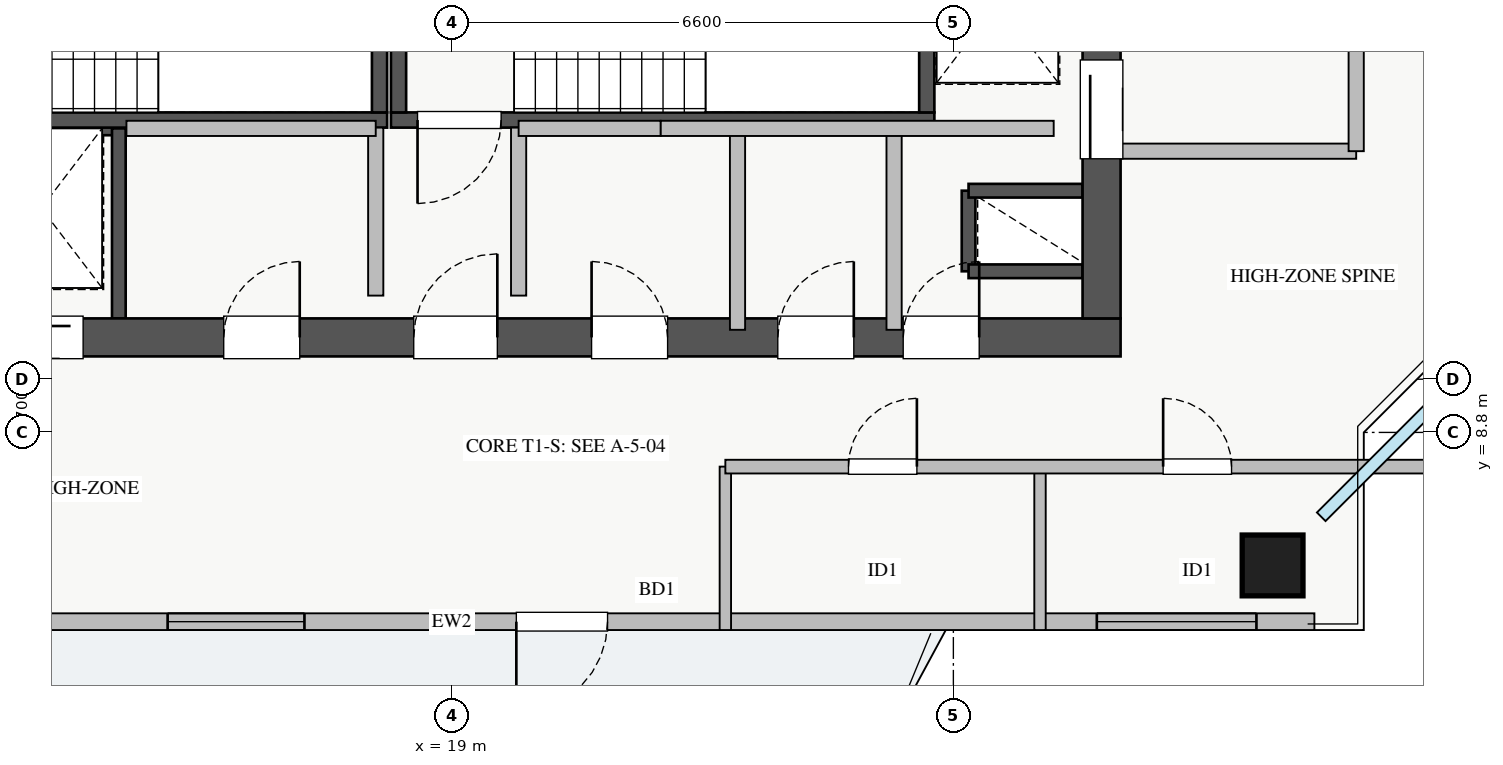
"""IFC4 building model, lengths in metres.
Left out: names, types, materials, properties, quantities, classifications, styles, units other than length and angle.
Written with IfcOpenShell. Run it as: python <this file> out.ifc"""

import sys

from ifc_helpers import new_model, si_unit, direction, frame, frame_2d, origin, origin_2d, place, context, subcontext, project, spatial, rectangle, extrude, source, transform, mapped, element, fill, save


model = new_model("IFC4")
c1 = context("Model", 3, precision=1e-05, world=origin(), true_north=direction((0.0, 1.0)))
c2 = subcontext(c1, "Body", "Model", "MODEL_VIEW")
j1 = project(units=[si_unit("LENGTHUNIT", "METRE"), si_unit("PLANEANGLEUNIT", "RADIAN")], contexts=[c1])
p1 = place(None, origin())
s1 = spatial("IfcSite", under=j1, at=p1, CompositionType="ELEMENT")
p2 = place(p1, origin())
s2 = spatial("IfcBuilding", under=s1, at=p2, CompositionType="ELEMENT")
p3 = place(p2, frame((0.0, 0.0, 200.25)))
s3 = spatial("IfcBuildingStorey", under=s2, at=p3, CompositionType="ELEMENT", Elevation=200.25)
p4 = place(p3, frame((12.68, 12.8, 0.0), z_axis=(0.0, 0.0, 1.0), x_axis=(1.0, 0.0, 0.0)))
e1 = element("IfcWall", 1, at=p4, inside=s3, PredefinedType="SHEAR", context=c2, shape_type="SweptSolid", body=[
    extrude(rectangle(XDim=1.94, YDim=0.18, at=frame_2d((0.97, 0.0))), origin(), (0.0, 0.0, 1.0), 3.07),
])
p5 = place(p3, frame((14.62, 10.3, 0.0), z_axis=(0.0, 0.0, 1.0), x_axis=(0.0, 1.0, 0.0)))
e2 = element("IfcWall", 2, at=p5, inside=s3, PredefinedType="SHEAR", context=c2, shape_type="SweptSolid", body=[
    extrude(rectangle(XDim=2.5, YDim=0.18, at=frame_2d((1.25, 0.0))), origin(), (0.0, 0.0, 1.0), 3.07),
])
p6 = place(p3, frame((25.8, 10.92, 0.0), z_axis=(0.0, 0.0, 1.0), x_axis=(0.0, 1.0, 0.0)))
e3 = element("IfcWall", 3, at=p6, inside=s3, PredefinedType="SHEAR", context=c2, shape_type="SweptSolid", body=[
    extrude(rectangle(XDim=1.06, YDim=0.18, at=frame_2d((0.53, 0.0))), origin(), (0.0, 0.0, 1.0), 3.07),
])
for number, where, z_axis, x_axis in (
    (4, (25.8, 11.98, 0.0), (0.0, 0.0, 1.0), (1.0, 0.0, 0.0)),
    (5, (25.8, 10.92, 0.0), (0.0, 0.0, 1.0), (1.0, 0.0, 0.0)),
):
    element("IfcWall", number, at=place(p3, frame(where, z_axis=z_axis, x_axis=x_axis)), inside=s3, PredefinedType="SHEAR", context=c2, shape_type="SweptSolid", body=[
        extrude(rectangle(XDim=1.5, YDim=0.18, at=frame_2d((0.75, 0.0))), origin(), (0.0, 0.0, 1.0), 3.07),
    ])
p7 = place(p3, frame((10.7, 12.91, 0.0), z_axis=(0.0, 0.0, 1.0), x_axis=(1.0, 0.0, 0.0)))
e6 = element("IfcWall", 6, at=p7, inside=s3, PredefinedType="SHEAR", context=c2, shape_type="SweptSolid", body=[
    extrude(rectangle(XDim=7.45, YDim=0.2, at=frame_2d((3.725, 0.0))), origin(), (0.0, 0.0, 1.0), 3.25),
])
p8 = place(p7, frame((0.35, 0.0, 0.0)))
e7 = element("IfcOpeningElement", 7, at=p8, cuts=e6, PredefinedType="OPENING", context=c2, shape_type="SweptSolid", body=[
    extrude(rectangle(XDim=1.1, YDim=2.05, at=frame_2d((0.55, 1.025))), frame((0.0, 0.11, 0.0), z_axis=(0.0, -1.0, 0.0), x_axis=(1.0, 0.0, 0.0)), (0.0, 0.0, 1.0), 0.22),
])
p9 = place(p3, frame((18.05, 13.01, 0.0), z_axis=(0.0, 0.0, 1.0), x_axis=(0.0, 1.0, 0.0)))
e8 = element("IfcWall", 8, at=p9, inside=s3, PredefinedType="SHEAR", context=c2, shape_type="SweptSolid", body=[
    extrude(rectangle(XDim=2.94, YDim=0.2, at=frame_2d((1.47, 0.0))), origin(), (0.0, 0.0, 1.0), 3.25),
])
p10 = place(p3, frame((18.2, 12.91, 0.0), z_axis=(0.0, 0.0, 1.0), x_axis=(1.0, 0.0, 0.0)))
e9 = element("IfcWall", 9, at=p10, inside=s3, PredefinedType="SHEAR", context=c2, shape_type="SweptSolid", body=[
    extrude(rectangle(XDim=7.15, YDim=0.2, at=frame_2d((3.575, 0.0))), origin(), (0.0, 0.0, 1.0), 3.25),
])
p11 = place(p10, frame((0.35, 0.0, 0.0)))
e10 = element("IfcOpeningElement", 10, at=p11, cuts=e9, PredefinedType="OPENING", context=c2, shape_type="SweptSolid", body=[
    extrude(rectangle(XDim=1.1, YDim=2.05, at=frame_2d((0.55, 1.025))), frame((0.0, 0.11, 0.0), z_axis=(0.0, -1.0, 0.0), x_axis=(1.0, 0.0, 0.0)), (0.0, 0.0, 1.0), 0.22),
])
for number, where, z_axis, x_axis in (
    (11, (18.3, 13.01, 0.0), (0.0, 0.0, 1.0), (0.0, 1.0, 0.0)),
    (12, (25.25, 13.01, 0.0), (0.0, 0.0, 1.0), (0.0, 1.0, 0.0)),
):
    element("IfcWall", number, at=place(p3, frame(where, z_axis=z_axis, x_axis=x_axis)), inside=s3, PredefinedType="SHEAR", context=c2, shape_type="SweptSolid", body=[
        extrude(rectangle(XDim=2.94, YDim=0.2, at=frame_2d((1.47, 0.0))), origin(), (0.0, 0.0, 1.0), 3.25),
    ])
p12 = place(p3, frame((10.2, 10.05, 0.0), z_axis=(0.0, 0.0, 1.0), x_axis=(1.0, 0.0, 0.0)))
e13 = element("IfcWall", 13, at=p12, inside=s3, PredefinedType="SHEAR", context=c2, shape_type="SweptSolid", body=[
    extrude(rectangle(XDim=17.6, YDim=0.5, at=frame_2d((8.8, 0.0))), origin(), (0.0, 0.0, 1.0), 3.25),
])
p13 = place(p12, frame((1.15, 0.0, 0.0)))
e14 = element("IfcOpeningElement", 14, at=p13, cuts=e13, PredefinedType="OPENING", context=c2, shape_type="SweptSolid", body=[
    extrude(rectangle(XDim=1.1, YDim=2.05, at=frame_2d((0.55, 1.025))), frame((0.0, 0.26, 0.0), z_axis=(0.0, -1.0, 0.0), x_axis=(1.0, 0.0, 0.0)), (0.0, 0.0, 1.0), 0.52),
])
p14 = place(p12, frame((8.3, 0.0, 0.0)))
e15 = element("IfcOpeningElement", 15, at=p14, cuts=e13, PredefinedType="OPENING", context=c2, shape_type="SweptSolid", body=[
    extrude(rectangle(XDim=1.1, YDim=2.05, at=frame_2d((0.55, 1.025))), frame((0.0, 0.26, 0.0), z_axis=(0.0, -1.0, 0.0), x_axis=(1.0, 0.0, 0.0)), (0.0, 0.0, 1.0), 0.52),
])
p15 = place(p12, frame((2.85, 0.0, 0.0)))
e16 = element("IfcOpeningElement", 16, at=p15, cuts=e13, PredefinedType="OPENING", context=c2, shape_type="SweptSolid", body=[
    extrude(rectangle(XDim=1.1, YDim=2.05, at=frame_2d((0.55, 1.025))), frame((0.0, 0.26, 0.0), z_axis=(0.0, -1.0, 0.0), x_axis=(1.0, 0.0, 0.0)), (0.0, 0.0, 1.0), 0.52),
])
p16 = place(p12, frame((5.8, 0.0, 0.0)))
e17 = element("IfcOpeningElement", 17, at=p16, cuts=e13, PredefinedType="OPENING", context=c2, shape_type="SweptSolid", body=[
    extrude(rectangle(XDim=1.0, YDim=2.05, at=frame_2d((0.5, 1.025))), frame((0.0, 0.26, 0.0), z_axis=(0.0, -1.0, 0.0), x_axis=(1.0, 0.0, 0.0)), (0.0, 0.0, 1.0), 0.52),
])
p17 = place(p12, frame((14.74, 0.0, 0.0)))
e18 = element("IfcOpeningElement", 18, at=p17, cuts=e13, PredefinedType="OPENING", context=c2, shape_type="SweptSolid", body=[
    extrude(rectangle(XDim=1.0, YDim=2.05, at=frame_2d((0.5, 1.025))), frame((0.0, 0.26, 0.0), z_axis=(0.0, -1.0, 0.0), x_axis=(1.0, 0.0, 0.0)), (0.0, 0.0, 1.0), 0.52),
])
p18 = place(p12, frame((10.64, 0.0, 0.0)))
e19 = element("IfcOpeningElement", 19, at=p18, cuts=e13, PredefinedType="OPENING", context=c2, shape_type="SweptSolid", body=[
    extrude(rectangle(XDim=1.0, YDim=2.05, at=frame_2d((0.5, 1.025))), frame((0.0, 0.26, 0.0), z_axis=(0.0, -1.0, 0.0), x_axis=(1.0, 0.0, 0.0)), (0.0, 0.0, 1.0), 0.52),
])
p19 = place(p12, frame((13.09, 0.0, 0.0)))
e20 = element("IfcOpeningElement", 20, at=p19, cuts=e13, PredefinedType="OPENING", context=c2, shape_type="SweptSolid", body=[
    extrude(rectangle(XDim=1.0, YDim=2.05, at=frame_2d((0.5, 1.025))), frame((0.0, 0.26, 0.0), z_axis=(0.0, -1.0, 0.0), x_axis=(1.0, 0.0, 0.0)), (0.0, 0.0, 1.0), 0.52),
])
p20 = place(p3, frame((27.55, 10.3, 0.0), z_axis=(0.0, 0.0, 1.0), x_axis=(0.0, 1.0, 0.0)))
e21 = element("IfcWall", 21, at=p20, inside=s3, PredefinedType="SHEAR", context=c2, shape_type="SweptSolid", body=[
    extrude(rectangle(XDim=6.2, YDim=0.5, at=frame_2d((3.1, 0.0))), origin(), (0.0, 0.0, 1.0), 3.25),
])
p21 = place(p20, frame((2.1, 0.0, 0.0)))
e22 = element("IfcOpeningElement", 22, at=p21, cuts=e21, PredefinedType="OPENING", context=c2, shape_type="SweptSolid", body=[
    extrude(rectangle(XDim=1.3, YDim=2.05, at=frame_2d((0.65, 1.025))), frame((0.0, 0.26, 0.0), z_axis=(0.0, -1.0, 0.0), x_axis=(1.0, 0.0, 0.0)), (0.0, 0.0, 1.0), 0.52),
])
m1 = source(origin(), c2, "Body", "SweptSolid", [
    extrude(rectangle(XDim=0.8, YDim=0.8, at=origin_2d()), origin(), (0.0, 0.0, 1.0), 3.25),
])
p22 = place(p3, frame((29.8, 7.05, 0.0), z_axis=(0.0, 0.0, 1.0), x_axis=(1.0, 0.0, 0.0)))
e23 = element("IfcColumn", 23, at=p22, inside=s3, PredefinedType="COLUMN", context=c2, shape_type="MappedRepresentation", body=[
    mapped(m1, transform((0.0, 0.0, 0.0), x_axis=(1.0, 0.0, 0.0), y_axis=(0.0, 1.0, 0.0), z_axis=(0.0, 0.0, 1.0), scale=1.0)),
])
p23 = place(p3, frame((7.65, 6.31, 0.0), z_axis=(0.0, 0.0, 1.0), x_axis=(1.0, 0.0, 0.0)))
e24 = element("IfcWall", 24, at=p23, inside=s3, PredefinedType="STANDARD", context=c2, shape_type="SweptSolid", body=[
    extrude(rectangle(XDim=22.7, YDim=0.22, at=frame_2d((11.35, 0.0))), origin(), (0.0, 0.0, 1.0), 2.61),
])
p24 = place(p23, frame((12.2, 0.0, 0.0)))
e25 = element("IfcOpeningElement", 25, at=p24, cuts=e24, PredefinedType="OPENING", context=c2, shape_type="SweptSolid", body=[
    extrude(rectangle(XDim=1.2, YDim=2.1, at=frame_2d((0.6, 1.05))), frame((0.0, 0.12, 0.0), z_axis=(0.0, -1.0, 0.0), x_axis=(1.0, 0.0, 0.0)), (0.0, 0.0, 1.0), 0.24),
])
p25 = place(p23, frame((1.637, 0.0, 0.9)))
e26 = element("IfcOpeningElement", 26, at=p25, cuts=e24, PredefinedType="OPENING", context=c2, shape_type="SweptSolid", body=[
    extrude(rectangle(XDim=2.4, YDim=1.48, at=frame_2d((1.2, 0.74))), frame((0.0, 0.12, 0.0), z_axis=(0.0, -1.0, 0.0), x_axis=(1.0, 0.0, 0.0)), (0.0, 0.0, 1.0), 0.24),
])
p26 = place(p23, frame((7.612, 0.0, 0.9)))
e27 = element("IfcOpeningElement", 27, at=p26, cuts=e24, PredefinedType="OPENING", context=c2, shape_type="SweptSolid", body=[
    extrude(rectangle(XDim=1.8, YDim=1.45, at=frame_2d((0.9, 0.725))), frame((0.0, 0.12, 0.0), z_axis=(0.0, -1.0, 0.0), x_axis=(1.0, 0.0, 0.0)), (0.0, 0.0, 1.0), 0.24),
])
p27 = place(p23, frame((19.837, 0.0, 0.9)))
e28 = element("IfcOpeningElement", 28, at=p27, cuts=e24, PredefinedType="OPENING", context=c2, shape_type="SweptSolid", body=[
    extrude(rectangle(XDim=2.1, YDim=1.5, at=frame_2d((1.05, 0.75))), frame((0.0, 0.12, 0.0), z_axis=(0.0, -1.0, 0.0), x_axis=(1.0, 0.0, 0.0)), (0.0, 0.0, 1.0), 0.24),
])
p28 = place(p3, frame((27.8, 12.5, 0.0), z_axis=(0.0, 0.0, 1.0), x_axis=(1.0, 0.0, 0.0)))
e29 = element("IfcWall", 29, at=p28, inside=s3, PredefinedType="PARTITIONING", context=c2, shape_type="SweptSolid", body=[
    extrude(rectangle(XDim=3.1, YDim=0.2, at=frame_2d((1.55, 0.0))), origin(), (0.0, 0.0, 1.0), 2.265),
])
p29 = place(p3, frame((30.9, 12.5, 0.0), z_axis=(0.0, 0.0, 1.0), x_axis=(0.0, 1.0, 0.0)))
e30 = element("IfcWall", 30, at=p29, inside=s3, PredefinedType="PARTITIONING", context=c2, shape_type="SweptSolid", body=[
    extrude(rectangle(XDim=3.9, YDim=0.2, at=frame_2d((1.95, 0.0))), origin(), (0.0, 0.0, 1.0), 3.07),
])
p30 = place(p29, frame((1.4, 0.0, 0.0)))
e31 = element("IfcOpeningElement", 31, at=p30, cuts=e30, PredefinedType="OPENING", context=c2, shape_type="SweptSolid", body=[
    extrude(rectangle(XDim=1.1, YDim=2.05, at=frame_2d((0.55, 1.025))), frame((0.0, 0.11, 0.0), z_axis=(0.0, -1.0, 0.0), x_axis=(1.0, 0.0, 0.0)), (0.0, 0.0, 1.0), 0.22),
])
for number, where, z_axis, x_axis in (
    (32, (18.0, 10.6, 0.0), (0.0, 0.0, 1.0), (0.0, 1.0, 0.0)),
    (33, (19.88, 10.6, 0.0), (0.0, 0.0, 1.0), (0.0, 1.0, 0.0)),
):
    element("IfcWall", number, at=place(p3, frame(where, z_axis=z_axis, x_axis=x_axis)), inside=s3, PredefinedType="PARTITIONING", context=c2, shape_type="SweptSolid", body=[
        extrude(rectangle(XDim=2.21, YDim=0.2, at=frame_2d((1.105, 0.0))), origin(), (0.0, 0.0, 1.0), 3.07),
    ])
p31 = place(p3, frame((14.72, 12.8, 0.0), z_axis=(0.0, 0.0, 1.0), x_axis=(1.0, 0.0, 0.0)))
e34 = element("IfcWall", 34, at=p31, inside=s3, PredefinedType="PARTITIONING", context=c2, shape_type="SweptSolid", body=[
    extrude(rectangle(XDim=3.28, YDim=0.2, at=frame_2d((1.64, 0.0))), origin(), (0.0, 0.0, 1.0), 3.07),
])
p32 = place(p3, frame((24.82, 10.15, 0.0), z_axis=(0.0, 0.0, 1.0), x_axis=(0.0, 1.0, 0.0)))
e35 = element("IfcWall", 35, at=p32, inside=s3, PredefinedType="PARTITIONING", context=c2, shape_type="SweptSolid", body=[
    extrude(rectangle(XDim=2.65, YDim=0.2, at=frame_2d((1.325, 0.0))), origin(), (0.0, 0.0, 1.0), 3.07),
])
p33 = place(p3, frame((19.88, 12.8, 0.0), z_axis=(0.0, 0.0, 1.0), x_axis=(1.0, 0.0, 0.0)))
e36 = element("IfcWall", 36, at=p33, inside=s3, PredefinedType="PARTITIONING", context=c2, shape_type="SweptSolid", body=[
    extrude(rectangle(XDim=1.87, YDim=0.2, at=frame_2d((0.935, 0.0))), origin(), (0.0, 0.0, 1.0), 3.07),
])
p34 = place(p3, frame((22.76, 10.15, 0.0), z_axis=(0.0, 0.0, 1.0), x_axis=(0.0, 1.0, 0.0)))
e37 = element("IfcWall", 37, at=p34, inside=s3, PredefinedType="PARTITIONING", context=c2, shape_type="SweptSolid", body=[
    extrude(rectangle(XDim=2.65, YDim=0.2, at=frame_2d((1.325, 0.0))), origin(), (0.0, 0.0, 1.0), 3.07),
])
p35 = place(p3, frame((21.75, 12.8, 0.0), z_axis=(0.0, 0.0, 1.0), x_axis=(1.0, 0.0, 0.0)))
e38 = element("IfcWall", 38, at=p35, inside=s3, PredefinedType="PARTITIONING", context=c2, shape_type="SweptSolid", body=[
    extrude(rectangle(XDim=5.17, YDim=0.2, at=frame_2d((2.585, 0.0))), origin(), (0.0, 0.0, 1.0), 3.07),
])
for number, where, z_axis, x_axis in (
    (39, (22.6, 6.2, 0.0), (0.0, 0.0, 1.0), (0.0, 1.0, 0.0)),
    (40, (26.74, 6.2, 0.0), (0.0, 0.0, 1.0), (0.0, 1.0, 0.0)),
):
    element("IfcWall", number, at=place(p3, frame(where, z_axis=z_axis, x_axis=x_axis)), inside=s3, PredefinedType="PARTITIONING", context=c2, shape_type="SweptSolid", body=[
        extrude(rectangle(XDim=2.15, YDim=0.15, at=frame_2d((1.075, 0.0))), origin(), (0.0, 0.0, 1.0), 3.07),
    ])
p36 = place(p3, frame((22.6, 8.35, 0.0), z_axis=(0.0, 0.0, 1.0), x_axis=(1.0, 0.0, 0.0)))
e41 = element("IfcWall", 41, at=p36, inside=s3, PredefinedType="PARTITIONING", context=c2, shape_type="SweptSolid", body=[
    extrude(rectangle(XDim=9.85, YDim=0.18, at=frame_2d((4.925, 0.0))), origin(), (0.0, 0.0, 1.0), 3.07),
])
p37 = place(p36, frame((1.62, 0.0, 0.0)))
e42 = element("IfcOpeningElement", 42, at=p37, cuts=e41, PredefinedType="OPENING", context=c2, shape_type="SweptSolid", body=[
    extrude(rectangle(XDim=0.9, YDim=2.05, at=frame_2d((0.45, 1.025))), frame((0.0, 0.1, 0.0), z_axis=(0.0, -1.0, 0.0), x_axis=(1.0, 0.0, 0.0)), (0.0, 0.0, 1.0), 0.2),
])
p38 = place(p36, frame((5.76, 0.0, 0.0)))
e43 = element("IfcOpeningElement", 43, at=p38, cuts=e41, PredefinedType="OPENING", context=c2, shape_type="SweptSolid", body=[
    extrude(rectangle(XDim=0.9, YDim=2.05, at=frame_2d((0.45, 1.025))), frame((0.0, 0.1, 0.0), z_axis=(0.0, -1.0, 0.0), x_axis=(1.0, 0.0, 0.0)), (0.0, 0.0, 1.0), 0.2),
])
m2 = source(origin(), c2, "Body", "SweptSolid", [
    extrude(rectangle(XDim=1.2, YDim=2.1, at=frame_2d((0.6, 1.05))), frame((0.0, 0.025, 0.0), z_axis=(0.0, -1.0, 0.0), x_axis=(1.0, 0.0, 0.0)), (0.0, 0.0, 1.0), 0.05),
])
p39 = place(p24, frame((1.2, 0.0, 0.0), z_axis=(0.0, 0.0, 1.0), x_axis=(-1.0, 0.0, 0.0)))
e44 = element("IfcDoor", 44, at=p39, inside=s3, OperationType="SINGLE_SWING_LEFT", PredefinedType="DOOR", context=c2, shape_type="MappedRepresentation", body=[
    mapped(m2, transform((0.0, 0.0, 0.0), x_axis=(1.0, 0.0, 0.0), y_axis=(0.0, 1.0, 0.0), z_axis=(0.0, 0.0, 1.0), scale=1.0)),
])
fill(e25, e44)
m3 = source(origin(), c2, "Body", "SweptSolid", [
    extrude(rectangle(XDim=1.8, YDim=1.45, at=frame_2d((0.9, 0.725))), frame((0.0, 0.03, 0.0), z_axis=(0.0, -1.0, 0.0), x_axis=(1.0, 0.0, 0.0)), (0.0, 0.0, 1.0), 0.06),
])
p40 = place(p26, origin())
e45 = element("IfcWindow", 45, at=p40, inside=s3, PartitioningType="DOUBLE_PANEL_VERTICAL", PredefinedType="WINDOW", context=c2, shape_type="MappedRepresentation", body=[
    mapped(m3, transform((0.0, 0.0, 0.0), x_axis=(1.0, 0.0, 0.0), y_axis=(0.0, 1.0, 0.0), z_axis=(0.0, 0.0, 1.0), scale=1.0)),
])
fill(e27, e45)
m4 = source(origin(), c2, "Body", "SweptSolid", [
    extrude(rectangle(XDim=2.1, YDim=1.5, at=frame_2d((1.05, 0.75))), frame((0.0, 0.03, 0.0), z_axis=(0.0, -1.0, 0.0), x_axis=(1.0, 0.0, 0.0)), (0.0, 0.0, 1.0), 0.06),
])
p41 = place(p27, origin())
e46 = element("IfcWindow", 46, at=p41, inside=s3, PartitioningType="TRIPLE_PANEL_VERTICAL", PredefinedType="WINDOW", context=c2, shape_type="MappedRepresentation", body=[
    mapped(m4, transform((0.0, 0.0, 0.0), x_axis=(1.0, 0.0, 0.0), y_axis=(0.0, 1.0, 0.0), z_axis=(0.0, 0.0, 1.0), scale=1.0)),
])
fill(e28, e46)
m5 = source(origin(), c2, "Body", "SweptSolid", [
    extrude(rectangle(XDim=1.3, YDim=2.05, at=frame_2d((0.65, 1.025))), frame((0.0, 0.025, 0.0), z_axis=(0.0, -1.0, 0.0), x_axis=(1.0, 0.0, 0.0)), (0.0, 0.0, 1.0), 0.05),
])
p42 = place(p21, origin())
e47 = element("IfcDoor", 47, at=p42, inside=s3, OperationType="SLIDING_TO_RIGHT", PredefinedType="DOOR", context=c2, shape_type="MappedRepresentation", body=[
    mapped(m5, transform((0.0, 0.0, 0.0), x_axis=(1.0, 0.0, 0.0), y_axis=(0.0, 1.0, 0.0), z_axis=(0.0, 0.0, 1.0), scale=1.0)),
])
fill(e22, e47)
m6 = source(origin(), c2, "Body", "SweptSolid", [
    extrude(rectangle(XDim=1.1, YDim=2.05, at=frame_2d((0.55, 1.025))), frame((0.0, 0.025, 0.0), z_axis=(0.0, -1.0, 0.0), x_axis=(1.0, 0.0, 0.0)), (0.0, 0.0, 1.0), 0.05),
])
p43 = place(p14, origin())
e48 = element("IfcDoor", 48, at=p43, inside=s3, OperationType="SINGLE_SWING_RIGHT", PredefinedType="DOOR", context=c2, shape_type="MappedRepresentation", body=[
    mapped(m6, transform((0.0, 0.0, 0.0), x_axis=(1.0, 0.0, 0.0), y_axis=(0.0, 1.0, 0.0), z_axis=(0.0, 0.0, 1.0), scale=1.0)),
])
fill(e15, e48)
p44 = place(p11, frame((1.1, 0.0, 0.0), z_axis=(0.0, 0.0, 1.0), x_axis=(-1.0, 0.0, 0.0)))
e49 = element("IfcDoor", 49, at=p44, inside=s3, OperationType="SINGLE_SWING_LEFT", PredefinedType="DOOR", context=c2, shape_type="MappedRepresentation", body=[
    mapped(m6, transform((0.0, 0.0, 0.0), x_axis=(1.0, 0.0, 0.0), y_axis=(0.0, 1.0, 0.0), z_axis=(0.0, 0.0, 1.0), scale=1.0)),
])
fill(e10, e49)
p45 = place(p15, origin())
e50 = element("IfcDoor", 50, at=p45, inside=s3, OperationType="SLIDING_TO_RIGHT", PredefinedType="DOOR", context=c2, shape_type="MappedRepresentation", body=[
    mapped(m6, transform((0.0, 0.0, 0.0), x_axis=(1.0, 0.0, 0.0), y_axis=(0.0, 1.0, 0.0), z_axis=(0.0, 0.0, 1.0), scale=1.0)),
])
fill(e16, e50)
m7 = source(origin(), c2, "Body", "SweptSolid", [
    extrude(rectangle(XDim=1.0, YDim=2.05, at=frame_2d((0.5, 1.025))), frame((0.0, 0.025, 0.0), z_axis=(0.0, -1.0, 0.0), x_axis=(1.0, 0.0, 0.0)), (0.0, 0.0, 1.0), 0.05),
])
p46 = place(p16, origin())
e51 = element("IfcDoor", 51, at=p46, inside=s3, OperationType="SINGLE_SWING_RIGHT", PredefinedType="DOOR", context=c2, shape_type="MappedRepresentation", body=[
    mapped(m7, transform((0.0, 0.0, 0.0), x_axis=(1.0, 0.0, 0.0), y_axis=(0.0, 1.0, 0.0), z_axis=(0.0, 0.0, 1.0), scale=1.0)),
])
fill(e17, e51)
p47 = place(p17, origin())
e52 = element("IfcDoor", 52, at=p47, inside=s3, OperationType="SINGLE_SWING_RIGHT", PredefinedType="DOOR", context=c2, shape_type="MappedRepresentation", body=[
    mapped(m7, transform((0.0, 0.0, 0.0), x_axis=(1.0, 0.0, 0.0), y_axis=(0.0, 1.0, 0.0), z_axis=(0.0, 0.0, 1.0), scale=1.0)),
])
fill(e18, e52)
p48 = place(p18, origin())
e53 = element("IfcDoor", 53, at=p48, inside=s3, OperationType="SINGLE_SWING_LEFT", PredefinedType="DOOR", context=c2, shape_type="MappedRepresentation", body=[
    mapped(m7, transform((0.0, 0.0, 0.0), x_axis=(1.0, 0.0, 0.0), y_axis=(0.0, 1.0, 0.0), z_axis=(0.0, 0.0, 1.0), scale=1.0)),
])
fill(e19, e53)
p49 = place(p19, origin())
e54 = element("IfcDoor", 54, at=p49, inside=s3, OperationType="SINGLE_SWING_RIGHT", PredefinedType="DOOR", context=c2, shape_type="MappedRepresentation", body=[
    mapped(m7, transform((0.0, 0.0, 0.0), x_axis=(1.0, 0.0, 0.0), y_axis=(0.0, 1.0, 0.0), z_axis=(0.0, 0.0, 1.0), scale=1.0)),
])
fill(e20, e54)
m8 = source(origin(), c2, "Body", "SweptSolid", [
    extrude(rectangle(XDim=0.9, YDim=2.05, at=frame_2d((0.45, 1.025))), frame((0.0, 0.025, 0.0), z_axis=(0.0, -1.0, 0.0), x_axis=(1.0, 0.0, 0.0)), (0.0, 0.0, 1.0), 0.05),
])
p50 = place(p37, origin())
e55 = element("IfcDoor", 55, at=p50, inside=s3, OperationType="SINGLE_SWING_RIGHT", PredefinedType="DOOR", context=c2, shape_type="MappedRepresentation", body=[
    mapped(m8, transform((0.0, 0.0, 0.0), x_axis=(1.0, 0.0, 0.0), y_axis=(0.0, 1.0, 0.0), z_axis=(0.0, 0.0, 1.0), scale=1.0)),
])
fill(e42, e55)
p51 = place(p38, origin())
e56 = element("IfcDoor", 56, at=p51, inside=s3, OperationType="SINGLE_SWING_LEFT", PredefinedType="DOOR", context=c2, shape_type="MappedRepresentation", body=[
    mapped(m8, transform((0.0, 0.0, 0.0), x_axis=(1.0, 0.0, 0.0), y_axis=(0.0, 1.0, 0.0), z_axis=(0.0, 0.0, 1.0), scale=1.0)),
])
fill(e43, e56)
save(model, sys.argv[1])
